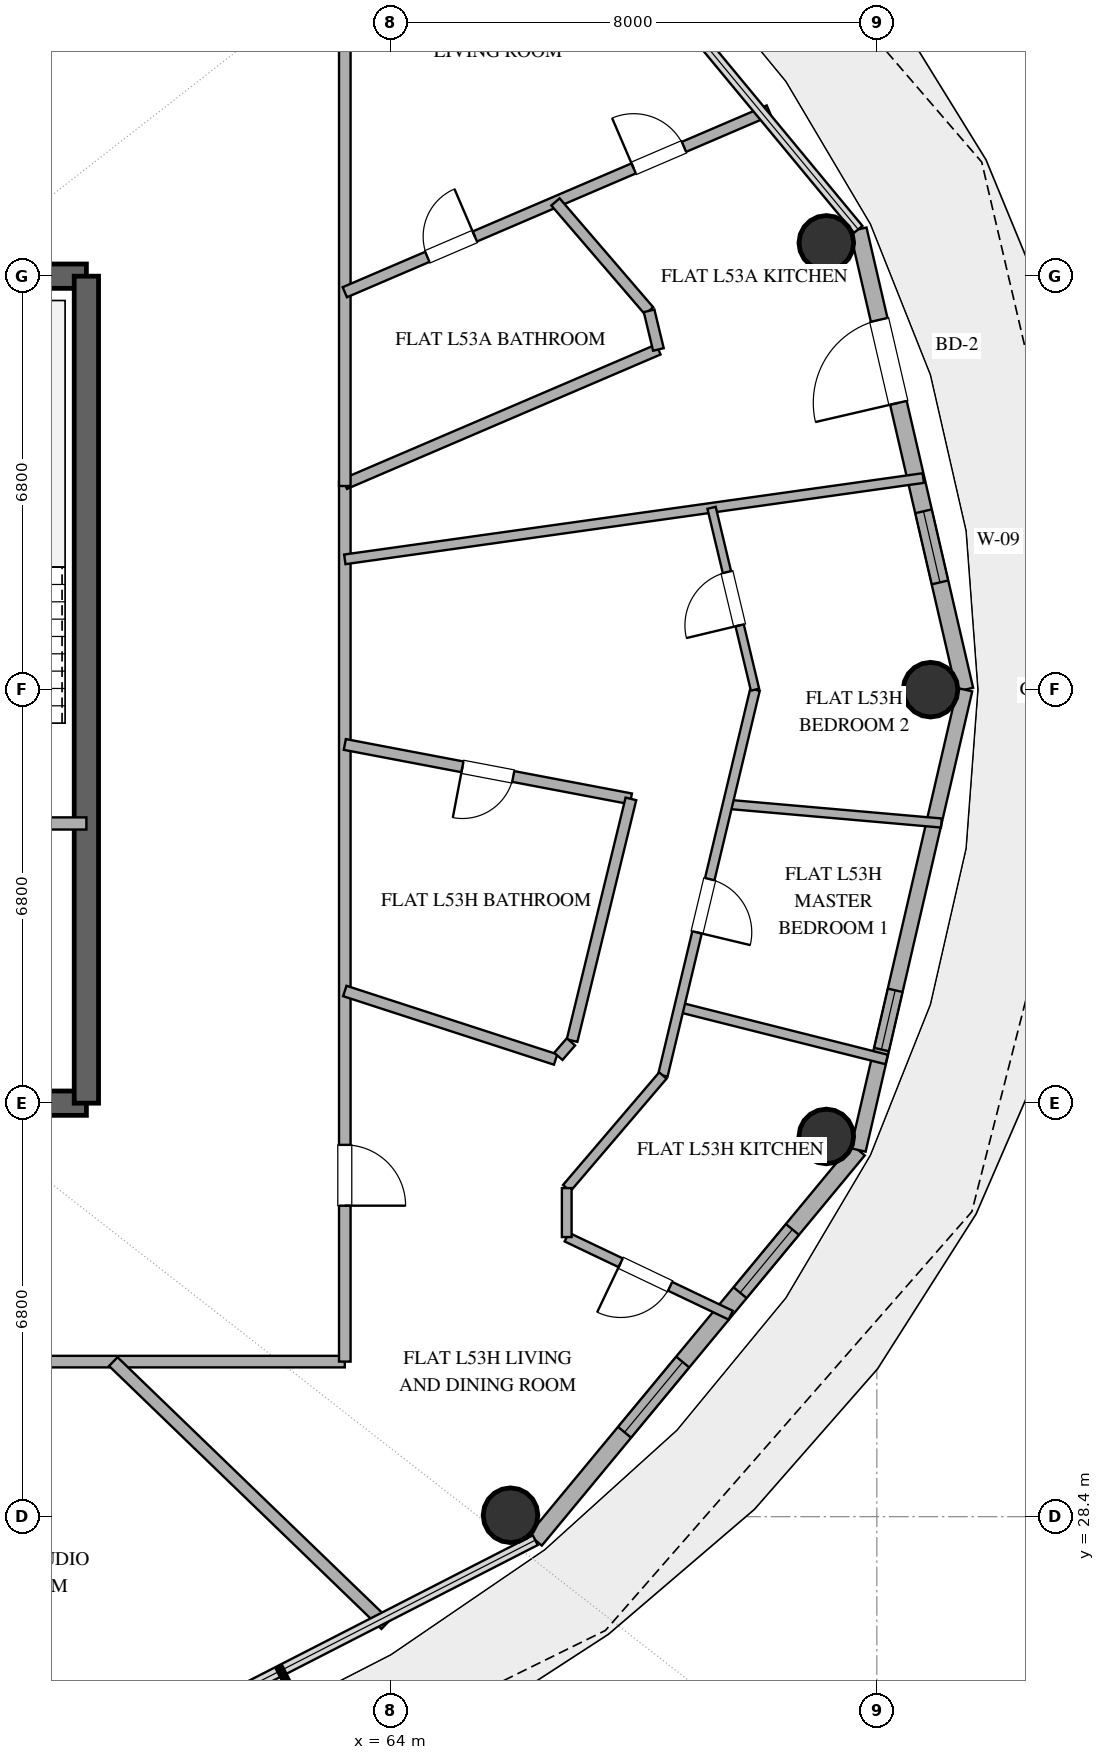
"""IFC4 building model, lengths in metres.
Left out: names, types, materials, properties, quantities, classifications, styles, units other than length and angle.
Written with IfcOpenShell. Run it as: python <this file> out.ifc"""

import sys

from ifc_helpers import new_model, si_unit, direction, frame, frame_2d, origin, origin_2d, place, context, subcontext, project, spatial, rectangle, hollow_circle, extrude, element, fill, save


model = new_model("IFC4")
c1 = context("Model", 3, precision=1e-05, world=origin(), true_north=direction((0.0, 1.0)))
c2 = subcontext(c1, "Body", "Model", "MODEL_VIEW")
j1 = project(units=[si_unit("LENGTHUNIT", "METRE"), si_unit("PLANEANGLEUNIT", "RADIAN")], contexts=[c1])
p1 = place(None, origin())
s1 = spatial("IfcSite", under=j1, at=p1, CompositionType="ELEMENT")
p2 = place(p1, origin())
s2 = spatial("IfcBuilding", under=s1, at=p2, CompositionType="ELEMENT")
p3 = place(p2, frame((0.0, 0.0, 210.0)))
s3 = spatial("IfcBuildingStorey", under=s2, at=p3, CompositionType="ELEMENT", Elevation=210.0)
p4 = place(p3, frame((55.0, 35.2, 0.0), z_axis=(0.0, 0.0, 1.0), x_axis=(1.0, 0.0, 0.0)))
e1 = element("IfcWall", 1, at=p4, inside=s3, PredefinedType="SHEAR", context=c2, shape_type="SweptSolid", body=[
    extrude(rectangle(XDim=4.0, YDim=0.4, at=frame_2d((2.0, 0.0))), origin(), (0.0, 0.0, 1.0), 3.36),
])
p5 = place(p4, frame((1.4, 0.0, 0.0)))
e2 = element("IfcOpeningElement", 2, at=p5, cuts=e1, PredefinedType="OPENING", context=c2, shape_type="SweptSolid", body=[
    extrude(rectangle(XDim=1.2, YDim=2.15, at=frame_2d((0.6, 1.075))), frame((0.0, 0.21, 0.0), z_axis=(0.0, -1.0, 0.0), x_axis=(1.0, 0.0, 0.0)), (0.0, 0.0, 1.0), 0.42),
])
p6 = place(p3, frame((55.0, 48.8, 0.0), z_axis=(0.0, 0.0, 1.0), x_axis=(1.0, 0.0, 0.0)))
e3 = element("IfcWall", 3, at=p6, inside=s3, PredefinedType="SHEAR", context=c2, shape_type="SweptSolid", body=[
    extrude(rectangle(XDim=4.0, YDim=0.4, at=frame_2d((2.0, 0.0))), origin(), (0.0, 0.0, 1.0), 3.36),
])
p7 = place(p3, frame((59.0, 35.2, 0.0), z_axis=(0.0, 0.0, 1.0), x_axis=(0.0, 1.0, 0.0)))
e4 = element("IfcWall", 4, at=p7, inside=s3, PredefinedType="SHEAR", context=c2, shape_type="SweptSolid", body=[
    extrude(rectangle(XDim=13.6, YDim=0.4, at=frame_2d((6.8, 0.0))), origin(), (0.0, 0.0, 1.0), 3.36),
])
for number, where, z_axis, x_axis in (
    (5, (72.883, 42.0, 0.0), (0.0, 0.0, 1.0), (1.0, 0.0, 0.0)),
    (6, (71.169, 49.347, 0.0), (0.0, 0.0, 1.0), (1.0, 0.0, 0.0)),
    (7, (65.975, 28.424, 0.0), (0.0, 0.0, 1.0), (1.0, 0.0, 0.0)),
    (8, (71.169, 34.653, 0.0), (0.0, 0.0, 1.0), (1.0, 0.0, 0.0)),
):
    element("IfcColumn", number, at=place(p3, frame(where, z_axis=z_axis, x_axis=x_axis)), inside=s3, PredefinedType="COLUMN", context=c2, shape_type="SweptSolid", body=[
        extrude(hollow_circle(Radius=0.45, WallThickness=0.025, at=origin_2d()), origin(), (0.0, 0.0, 1.0), 3.36),
    ])
p8 = place(p3, frame((73.447, 42.0, 0.0), z_axis=(0.0, 0.0, 1.0), x_axis=(-0.225635078214, 0.974211892495, 0.0)))
e9 = element("IfcWall", 9, at=p8, inside=s3, PredefinedType="SOLIDWALL", context=c2, shape_type="SweptSolid", body=[
    extrude(rectangle(XDim=7.77, YDim=0.28, at=frame_2d((3.885, 0.0))), origin(), (0.0, 0.0, 1.0), 3.36),
])
p9 = place(p8, frame((1.811, 0.0, 0.85)))
e10 = element("IfcOpeningElement", 10, at=p9, cuts=e9, PredefinedType="OPENING", context=c2, shape_type="SweptSolid", body=[
    extrude(rectangle(XDim=1.2, YDim=1.8, at=frame_2d((0.6, 0.9))), frame((0.0, 0.15, 0.0), z_axis=(0.0, -1.0, 0.0), x_axis=(1.0, 0.0, 0.0)), (0.0, 0.0, 1.0), 0.3),
])
p10 = place(p8, frame((4.842, 0.0, 0.0)))
e11 = element("IfcOpeningElement", 11, at=p10, cuts=e9, PredefinedType="OPENING", context=c2, shape_type="SweptSolid", body=[
    extrude(rectangle(XDim=1.4, YDim=2.2, at=frame_2d((0.7, 1.1))), frame((0.0, 0.15, 0.0), z_axis=(0.0, -1.0, 0.0), x_axis=(1.0, 0.0, 0.0)), (0.0, 0.0, 1.0), 0.3),
])
p11 = place(p3, frame((66.383, 28.013, 0.0), z_axis=(0.0, 0.0, 1.0), x_axis=(0.63761509934, 0.770355103243, 0.0)))
e12 = element("IfcWall", 12, at=p11, inside=s3, PredefinedType="SOLIDWALL", context=c2, shape_type="SweptSolid", body=[
    extrude(rectangle(XDim=8.33, YDim=0.28, at=frame_2d((4.165, 0.0))), origin(), (0.0, 0.0, 1.0), 3.36),
])
p12 = place(p11, frame((2.303, 0.0, 0.85)))
e13 = element("IfcOpeningElement", 13, at=p12, cuts=e12, PredefinedType="OPENING", context=c2, shape_type="SweptSolid", body=[
    extrude(rectangle(XDim=1.5, YDim=1.8, at=frame_2d((0.75, 0.9))), frame((0.0, 0.15, 0.0), z_axis=(0.0, -1.0, 0.0), x_axis=(1.0, 0.0, 0.0)), (0.0, 0.0, 1.0), 0.3),
])
p13 = place(p11, frame((5.283, 0.0, 0.85)))
e14 = element("IfcOpeningElement", 14, at=p13, cuts=e12, PredefinedType="OPENING", context=c2, shape_type="SweptSolid", body=[
    extrude(rectangle(XDim=1.35, YDim=1.8, at=frame_2d((0.675, 0.9))), frame((0.0, 0.15, 0.0), z_axis=(0.0, -1.0, 0.0), x_axis=(1.0, 0.0, 0.0)), (0.0, 0.0, 1.0), 0.3),
])
p14 = place(p3, frame((71.694, 34.43, 0.0), z_axis=(0.0, 0.0, 1.0), x_axis=(0.225635078214, 0.974211892495, 0.0)))
e15 = element("IfcWall", 15, at=p14, inside=s3, PredefinedType="SOLIDWALL", context=c2, shape_type="SweptSolid", body=[
    extrude(rectangle(XDim=7.77, YDim=0.25, at=frame_2d((3.885, 0.0))), origin(), (0.0, 0.0, 1.0), 3.36),
])
p15 = place(p14, frame((1.695, 0.0, 0.35)))
e16 = element("IfcOpeningElement", 16, at=p15, cuts=e15, PredefinedType="OPENING", context=c2, shape_type="SweptSolid", body=[
    extrude(rectangle(XDim=1.0, YDim=1.05, at=frame_2d((0.5, 0.525))), frame((0.0, 0.135, 0.0), z_axis=(0.0, -1.0, 0.0), x_axis=(1.0, 0.0, 0.0)), (0.0, 0.0, 1.0), 0.27),
])
p16 = place(p3, frame((55.0, 39.8, 0.0), z_axis=(0.0, 0.0, 1.0), x_axis=(1.0, 0.0, 0.0)))
e17 = element("IfcWall", 17, at=p16, inside=s3, PredefinedType="SOLIDWALL", context=c2, shape_type="SweptSolid", body=[
    extrude(rectangle(XDim=4.0, YDim=0.2, at=frame_2d((2.0, 0.0))), origin(), (0.0, 0.0, 1.0), 2.72),
])
p17 = place(p16, frame((1.45, 0.0, 0.0)))
e18 = element("IfcOpeningElement", 18, at=p17, cuts=e17, PredefinedType="OPENING", context=c2, shape_type="SweptSolid", body=[
    extrude(rectangle(XDim=1.1, YDim=2.15, at=frame_2d((0.55, 1.075))), frame((0.0, 0.11, 0.0), z_axis=(0.0, -1.0, 0.0), x_axis=(1.0, 0.0, 0.0)), (0.0, 0.0, 1.0), 0.22),
])
p18 = place(p3, frame((50.961, 30.95, 0.0), z_axis=(0.0, 0.0, 1.0), x_axis=(1.0, 0.0, 0.0)))
e19 = element("IfcWall", 19, at=p18, inside=s3, PredefinedType="PARTITIONING", context=c2, shape_type="SweptSolid", body=[
    extrude(rectangle(XDim=12.289, YDim=0.19, at=frame_2d((6.145, 0.0))), origin(), (0.0, 0.0, 1.0), 2.72),
])
p19 = place(p18, frame((3.741, 0.0, 0.0)))
e20 = element("IfcOpeningElement", 20, at=p19, cuts=e19, PredefinedType="OPENING", context=c2, shape_type="SweptSolid", body=[
    extrude(rectangle(XDim=1.0, YDim=2.2, at=frame_2d((0.5, 1.1))), frame((0.0, 0.105, 0.0), z_axis=(0.0, -1.0, 0.0), x_axis=(1.0, 0.0, 0.0)), (0.0, 0.0, 1.0), 0.21),
])
p20 = place(p3, frame((63.921, 26.625, 0.0), z_axis=(0.0, 0.0, 1.0), x_axis=(-0.719350784266, 0.69464699609, 0.0)))
e21 = element("IfcWall", 21, at=p20, inside=s3, PredefinedType="PARTITIONING", context=c2, shape_type="SweptSolid", body=[
    extrude(rectangle(XDim=6.226, YDim=0.2, at=frame_2d((3.113, 0.0))), origin(), (0.0, 0.0, 1.0), 2.72),
])
p21 = place(p3, frame((63.25, 45.419, 0.0), z_axis=(0.0, 0.0, 1.0), x_axis=(0.0, -1.0, 0.0)))
e22 = element("IfcWall", 22, at=p21, inside=s3, PredefinedType="PARTITIONING", context=c2, shape_type="SweptSolid", body=[
    extrude(rectangle(XDim=14.469, YDim=0.19, at=frame_2d((7.235, 0.0))), origin(), (0.0, 0.0, 1.0), 2.72),
])
p22 = place(p21, frame((10.905, 0.0, 0.0)))
e23 = element("IfcOpeningElement", 23, at=p22, cuts=e22, PredefinedType="OPENING", context=c2, shape_type="SweptSolid", body=[
    extrude(rectangle(XDim=1.0, YDim=2.2, at=frame_2d((0.5, 1.1))), frame((0.0, 0.105, 0.0), z_axis=(0.0, -1.0, 0.0), x_axis=(1.0, 0.0, 0.0)), (0.0, 0.0, 1.0), 0.21),
])
p23 = place(p3, frame((63.25, 44.143, 0.0), z_axis=(0.0, 0.0, 1.0), x_axis=(0.990269661234, 0.139161769316, 0.0)))
e24 = element("IfcWall", 24, at=p23, inside=s3, PredefinedType="PLUMBINGWALL", context=c2, shape_type="SweptSolid", body=[
    extrude(rectangle(XDim=9.607, YDim=0.16, at=frame_2d((4.803, 0.0))), origin(), (0.0, 0.0, 1.0), 2.72),
])
p24 = place(p3, frame((68.407, 47.595, 0.0), z_axis=(0.0, 0.0, 1.0), x_axis=(-0.919138278408, -0.393935051963, 0.0)))
e25 = element("IfcWall", 25, at=p24, inside=s3, PredefinedType="PLUMBINGWALL", context=c2, shape_type="SweptSolid", body=[
    extrude(rectangle(XDim=5.611, YDim=0.18, at=frame_2d((2.806, 0.0))), origin(), (0.0, 0.0, 1.0), 2.72),
])
p25 = place(p3, frame((67.955, 40.205, 0.0), z_axis=(0.0, 0.0, 1.0), x_axis=(-0.982404536053, 0.186765434551, 0.0)))
e26 = element("IfcWall", 26, at=p25, inside=s3, PredefinedType="PLUMBINGWALL", context=c2, shape_type="SweptSolid", body=[
    extrude(rectangle(XDim=4.79, YDim=0.18, at=frame_2d((2.395, 0.0))), origin(), (0.0, 0.0, 1.0), 2.72),
])
p26 = place(p25, frame((1.97, 0.0, 0.0)))
e27 = element("IfcOpeningElement", 27, at=p26, cuts=e26, PredefinedType="OPENING", context=c2, shape_type="SweptSolid", body=[
    extrude(rectangle(XDim=0.85, YDim=2.1, at=frame_2d((0.425, 1.05))), frame((0.0, 0.1, 0.0), z_axis=(0.0, -1.0, 0.0), x_axis=(1.0, 0.0, 0.0)), (0.0, 0.0, 1.0), 0.2),
])
p27 = place(p3, frame((63.25, 45.35, 0.0), z_axis=(0.0, 0.0, 1.0), x_axis=(0.0, 1.0, 0.0)))
e28 = element("IfcWall", 28, at=p27, inside=s3, PredefinedType="PARTITIONING", context=c2, shape_type="SweptSolid", body=[
    extrude(rectangle(XDim=7.7, YDim=0.19, at=frame_2d((3.85, 0.0))), origin(), (0.0, 0.0, 1.0), 2.72),
])
p28 = place(p3, frame((66.988, 36.229, 0.0), z_axis=(0.0, 0.0, 1.0), x_axis=(0.236522101202, 0.971626108975, 0.0)))
e29 = element("IfcWall", 29, at=p28, inside=s3, PredefinedType="PLUMBINGWALL", context=c2, shape_type="SweptSolid", body=[
    extrude(rectangle(XDim=4.092, YDim=0.18, at=frame_2d((2.046, 0.0))), origin(), (0.0, 0.0, 1.0), 2.72),
])
p29 = place(p3, frame((63.25, 48.536, 0.0), z_axis=(0.0, 0.0, 1.0), x_axis=(0.919133380172, 0.393946480443, 0.0)))
e30 = element("IfcWall", 30, at=p29, inside=s3, PredefinedType="PLUMBINGWALL", context=c2, shape_type="SweptSolid", body=[
    extrude(rectangle(XDim=7.588, YDim=0.18, at=frame_2d((3.794, 0.0))), origin(), (0.0, 0.0, 1.0), 2.72),
])
p30 = place(p29, frame((5.169, 0.0, 0.0)))
e31 = element("IfcOpeningElement", 31, at=p30, cuts=e30, PredefinedType="OPENING", context=c2, shape_type="SweptSolid", body=[
    extrude(rectangle(XDim=0.9, YDim=2.1, at=frame_2d((0.45, 1.05))), frame((0.0, 0.1, 0.0), z_axis=(0.0, -1.0, 0.0), x_axis=(1.0, 0.0, 0.0)), (0.0, 0.0, 1.0), 0.2),
])
p31 = place(p29, frame((1.477, 0.0, 0.0)))
e32 = element("IfcOpeningElement", 32, at=p31, cuts=e30, PredefinedType="OPENING", context=c2, shape_type="SweptSolid", body=[
    extrude(rectangle(XDim=0.85, YDim=2.1, at=frame_2d((0.425, 1.05))), frame((0.0, 0.1, 0.0), z_axis=(0.0, -1.0, 0.0), x_axis=(1.0, 0.0, 0.0)), (0.0, 0.0, 1.0), 0.2),
])
p32 = place(p3, frame((63.25, 37.045, 0.0), z_axis=(0.0, 0.0, 1.0), x_axis=(0.951066543841, -0.308986131058, 0.0)))
e33 = element("IfcWall", 33, at=p32, inside=s3, PredefinedType="PLUMBINGWALL", context=c2, shape_type="SweptSolid", body=[
    extrude(rectangle(XDim=3.646, YDim=0.18, at=frame_2d((1.823, 0.0))), origin(), (0.0, 0.0, 1.0), 2.72),
])
p33 = place(p3, frame((73.061, 39.807, 0.0), z_axis=(0.0, 0.0, 1.0), x_axis=(-0.996192140099, 0.087184975795, 0.0)))
e34 = element("IfcWall", 34, at=p33, inside=s3, PredefinedType="PARTITIONING", context=c2, shape_type="SweptSolid", body=[
    extrude(rectangle(XDim=3.528, YDim=0.15, at=frame_2d((1.764, 0.0))), origin(), (0.0, 0.0, 1.0), 2.72),
])
p34 = place(p3, frame((68.749, 36.778, 0.0), z_axis=(0.0, 0.0, 1.0), x_axis=(0.96975767026, -0.244069787092, 0.0)))
e35 = element("IfcWall", 35, at=p34, inside=s3, PredefinedType="PLUMBINGWALL", context=c2, shape_type="SweptSolid", body=[
    extrude(rectangle(XDim=3.519, YDim=0.16, at=frame_2d((1.76, 0.0))), origin(), (0.0, 0.0, 1.0), 2.72),
])
p35 = place(p3, frame((69.996, 42.0, 0.0), z_axis=(0.0, 0.0, 1.0), x_axis=(-0.232298462197, -0.972644551962, 0.0)))
e36 = element("IfcWall", 36, at=p35, inside=s3, PredefinedType="PLUMBINGWALL", context=c2, shape_type="SweptSolid", body=[
    extrude(rectangle(XDim=6.523, YDim=0.16, at=frame_2d((3.262, 0.0))), origin(), (0.0, 0.0, 1.0), 2.72),
])
p36 = place(p35, frame((3.204, 0.0, 0.0)))
e37 = element("IfcOpeningElement", 37, at=p36, cuts=e36, PredefinedType="OPENING", context=c2, shape_type="SweptSolid", body=[
    extrude(rectangle(XDim=0.9, YDim=2.1, at=frame_2d((0.45, 1.05))), frame((0.0, 0.09, 0.0), z_axis=(0.0, -1.0, 0.0), x_axis=(1.0, 0.0, 0.0)), (0.0, 0.0, 1.0), 0.18),
])
p37 = place(p3, frame((69.996, 42.0, 0.0), z_axis=(0.0, 0.0, 1.0), x_axis=(-0.23230382896, 0.972643270192, 0.0)))
e38 = element("IfcWall", 38, at=p37, inside=s3, PredefinedType="PARTITIONING", context=c2, shape_type="SweptSolid", body=[
    extrude(rectangle(XDim=3.075, YDim=0.14, at=frame_2d((1.538, 0.0))), origin(), (0.0, 0.0, 1.0), 2.72),
])
p38 = place(p37, frame((1.088, 0.0, 0.0)))
e39 = element("IfcOpeningElement", 39, at=p38, cuts=e38, PredefinedType="OPENING", context=c2, shape_type="SweptSolid", body=[
    extrude(rectangle(XDim=0.9, YDim=2.1, at=frame_2d((0.45, 1.05))), frame((0.0, 0.08, 0.0), z_axis=(0.0, -1.0, 0.0), x_axis=(1.0, 0.0, 0.0)), (0.0, 0.0, 1.0), 0.16),
])
p39 = place(p3, frame((69.596, 31.714, 0.0), z_axis=(0.0, 0.0, 1.0), x_axis=(-0.902830295341, 0.42999704396, 0.0)))
e40 = element("IfcWall", 40, at=p39, inside=s3, PredefinedType="PLUMBINGWALL", context=c2, shape_type="SweptSolid", body=[
    extrude(rectangle(XDim=2.987, YDim=0.16, at=frame_2d((1.493, 0.0))), origin(), (0.0, 0.0, 1.0), 2.72),
])
p40 = place(p39, frame((1.103, 0.0, 0.0)))
e41 = element("IfcOpeningElement", 41, at=p40, cuts=e40, PredefinedType="OPENING", context=c2, shape_type="SweptSolid", body=[
    extrude(rectangle(XDim=0.9, YDim=2.1, at=frame_2d((0.45, 1.05))), frame((0.0, 0.09, 0.0), z_axis=(0.0, -1.0, 0.0), x_axis=(1.0, 0.0, 0.0)), (0.0, 0.0, 1.0), 0.18),
])
p41 = place(p3, frame((66.9, 33.803, 0.0), z_axis=(0.0, 0.0, 1.0), x_axis=(0.649270866973, 0.760557257082, 0.0)))
e42 = element("IfcWall", 42, at=p41, inside=s3, PredefinedType="PLUMBINGWALL", context=c2, shape_type="SweptSolid", body=[
    extrude(rectangle(XDim=2.435, YDim=0.16, at=frame_2d((1.218, 0.0))), origin(), (0.0, 0.0, 1.0), 2.72),
])
p42 = place(p3, frame((66.715, 50.021, 0.0), z_axis=(0.0, 0.0, 1.0), x_axis=(0.651871704999, -0.758329268999, 0.0)))
e43 = element("IfcWall", 43, at=p42, inside=s3, PredefinedType="PLUMBINGWALL", context=c2, shape_type="SweptSolid", body=[
    extrude(rectangle(XDim=2.362, YDim=0.18, at=frame_2d((1.181, 0.0))), origin(), (0.0, 0.0, 1.0), 2.72),
])
p43 = place(p3, frame((66.9, 32.998, 0.0), z_axis=(0.0, 0.0, 1.0), x_axis=(0.0, 1.0, 0.0)))
e44 = element("IfcWall", 44, at=p43, inside=s3, PredefinedType="PLUMBINGWALL", context=c2, shape_type="SweptSolid", body=[
    extrude(rectangle(XDim=0.805, YDim=0.16, at=frame_2d((0.402, 0.0))), origin(), (0.0, 0.0, 1.0), 2.72),
])
p44 = place(p3, frame((68.255, 48.23, 0.0), z_axis=(0.0, 0.0, 1.0), x_axis=(0.233909944351, -0.972258267095, 0.0)))
e45 = element("IfcWall", 45, at=p44, inside=s3, PredefinedType="PLUMBINGWALL", context=c2, shape_type="SweptSolid", body=[
    extrude(rectangle(XDim=0.653, YDim=0.18, at=frame_2d((0.327, 0.0))), origin(), (0.0, 0.0, 1.0), 2.72),
])
p45 = place(p3, frame((66.762, 35.97, 0.0), z_axis=(0.0, 0.0, 1.0), x_axis=(0.656312676344, 0.754489013088, 0.0)))
e46 = element("IfcWall", 46, at=p45, inside=s3, PredefinedType="PLUMBINGWALL", context=c2, shape_type="SweptSolid", body=[
    extrude(rectangle(XDim=0.316, YDim=0.18, at=frame_2d((0.158, 0.0))), origin(), (0.0, 0.0, 1.0), 2.72),
])
p46 = place(p9, origin())
e47 = element("IfcWindow", 47, at=p46, inside=s3, PartitioningType="SINGLE_PANEL", PredefinedType="WINDOW", context=c2, shape_type="SweptSolid", body=[
    extrude(rectangle(XDim=1.2, YDim=1.8, at=frame_2d((0.6, 0.9))), frame((0.0, 0.03, 0.0), z_axis=(0.0, -1.0, 0.0), x_axis=(1.0, 0.0, 0.0)), (0.0, 0.0, 1.0), 0.06),
])
fill(e10, e47)
p47 = place(p10, origin())
e48 = element("IfcDoor", 48, at=p47, inside=s3, OperationType="SINGLE_SWING_LEFT", PredefinedType="DOOR", context=c2, shape_type="SweptSolid", body=[
    extrude(rectangle(XDim=1.4, YDim=2.2, at=frame_2d((0.7, 1.1))), frame((0.0, 0.025, 0.0), z_axis=(0.0, -1.0, 0.0), x_axis=(1.0, 0.0, 0.0)), (0.0, 0.0, 1.0), 0.05),
])
fill(e11, e48)
p48 = place(p12, origin())
e49 = element("IfcWindow", 49, at=p48, inside=s3, PartitioningType="SINGLE_PANEL", PredefinedType="WINDOW", context=c2, shape_type="SweptSolid", body=[
    extrude(rectangle(XDim=1.5, YDim=1.8, at=frame_2d((0.75, 0.9))), frame((0.0, 0.03, 0.0), z_axis=(0.0, -1.0, 0.0), x_axis=(1.0, 0.0, 0.0)), (0.0, 0.0, 1.0), 0.06),
])
fill(e13, e49)
p49 = place(p13, origin())
e50 = element("IfcWindow", 50, at=p49, inside=s3, PartitioningType="SINGLE_PANEL", PredefinedType="WINDOW", context=c2, shape_type="SweptSolid", body=[
    extrude(rectangle(XDim=1.35, YDim=1.8, at=frame_2d((0.675, 0.9))), frame((0.0, 0.03, 0.0), z_axis=(0.0, -1.0, 0.0), x_axis=(1.0, 0.0, 0.0)), (0.0, 0.0, 1.0), 0.06),
])
fill(e14, e50)
p50 = place(p15, origin())
e51 = element("IfcWindow", 51, at=p50, inside=s3, PartitioningType="SINGLE_PANEL", PredefinedType="WINDOW", context=c2, shape_type="SweptSolid", body=[
    extrude(rectangle(XDim=1.0, YDim=1.05, at=frame_2d((0.5, 0.525))), frame((0.0, 0.03, 0.0), z_axis=(0.0, -1.0, 0.0), x_axis=(1.0, 0.0, 0.0)), (0.0, 0.0, 1.0), 0.06),
])
fill(e16, e51)
p51 = place(p22, origin())
e52 = element("IfcDoor", 52, at=p51, inside=s3, OperationType="SINGLE_SWING_RIGHT", PredefinedType="DOOR", context=c2, shape_type="SweptSolid", body=[
    extrude(rectangle(XDim=1.0, YDim=2.2, at=frame_2d((0.5, 1.1))), frame((0.0, 0.025, 0.0), z_axis=(0.0, -1.0, 0.0), x_axis=(1.0, 0.0, 0.0)), (0.0, 0.0, 1.0), 0.05),
])
fill(e23, e52)
p52 = place(p26, origin())
e53 = element("IfcDoor", 53, at=p52, inside=s3, OperationType="SINGLE_SWING_RIGHT", PredefinedType="DOOR", context=c2, shape_type="SweptSolid", body=[
    extrude(rectangle(XDim=0.85, YDim=2.1, at=frame_2d((0.425, 1.05))), frame((0.0, 0.025, 0.0), z_axis=(0.0, -1.0, 0.0), x_axis=(1.0, 0.0, 0.0)), (0.0, 0.0, 1.0), 0.05),
])
fill(e27, e53)
p53 = place(p30, origin())
e54 = element("IfcDoor", 54, at=p53, inside=s3, OperationType="SINGLE_SWING_LEFT", PredefinedType="DOOR", context=c2, shape_type="SweptSolid", body=[
    extrude(rectangle(XDim=0.9, YDim=2.1, at=frame_2d((0.45, 1.05))), frame((0.0, 0.025, 0.0), z_axis=(0.0, -1.0, 0.0), x_axis=(1.0, 0.0, 0.0)), (0.0, 0.0, 1.0), 0.05),
])
fill(e31, e54)
p54 = place(p31, origin())
e55 = element("IfcDoor", 55, at=p54, inside=s3, OperationType="SINGLE_SWING_RIGHT", PredefinedType="DOOR", context=c2, shape_type="SweptSolid", body=[
    extrude(rectangle(XDim=0.85, YDim=2.1, at=frame_2d((0.425, 1.05))), frame((0.0, 0.025, 0.0), z_axis=(0.0, -1.0, 0.0), x_axis=(1.0, 0.0, 0.0)), (0.0, 0.0, 1.0), 0.05),
])
fill(e32, e55)
p55 = place(p36, origin())
e56 = element("IfcDoor", 56, at=p55, inside=s3, OperationType="SINGLE_SWING_RIGHT", PredefinedType="DOOR", context=c2, shape_type="SweptSolid", body=[
    extrude(rectangle(XDim=0.9, YDim=2.1, at=frame_2d((0.45, 1.05))), frame((0.0, 0.025, 0.0), z_axis=(0.0, -1.0, 0.0), x_axis=(1.0, 0.0, 0.0)), (0.0, 0.0, 1.0), 0.05),
])
fill(e37, e56)
p56 = place(p38, origin())
e57 = element("IfcDoor", 57, at=p56, inside=s3, OperationType="SINGLE_SWING_LEFT", PredefinedType="DOOR", context=c2, shape_type="SweptSolid", body=[
    extrude(rectangle(XDim=0.9, YDim=2.1, at=frame_2d((0.45, 1.05))), frame((0.0, 0.025, 0.0), z_axis=(0.0, -1.0, 0.0), x_axis=(1.0, 0.0, 0.0)), (0.0, 0.0, 1.0), 0.05),
])
fill(e39, e57)
p57 = place(p40, origin())
e58 = element("IfcDoor", 58, at=p57, inside=s3, OperationType="SINGLE_SWING_RIGHT", PredefinedType="DOOR", context=c2, shape_type="SweptSolid", body=[
    extrude(rectangle(XDim=0.9, YDim=2.1, at=frame_2d((0.45, 1.05))), frame((0.0, 0.025, 0.0), z_axis=(0.0, -1.0, 0.0), x_axis=(1.0, 0.0, 0.0)), (0.0, 0.0, 1.0), 0.05),
])
fill(e41, e58)
save(model, sys.argv[1])
